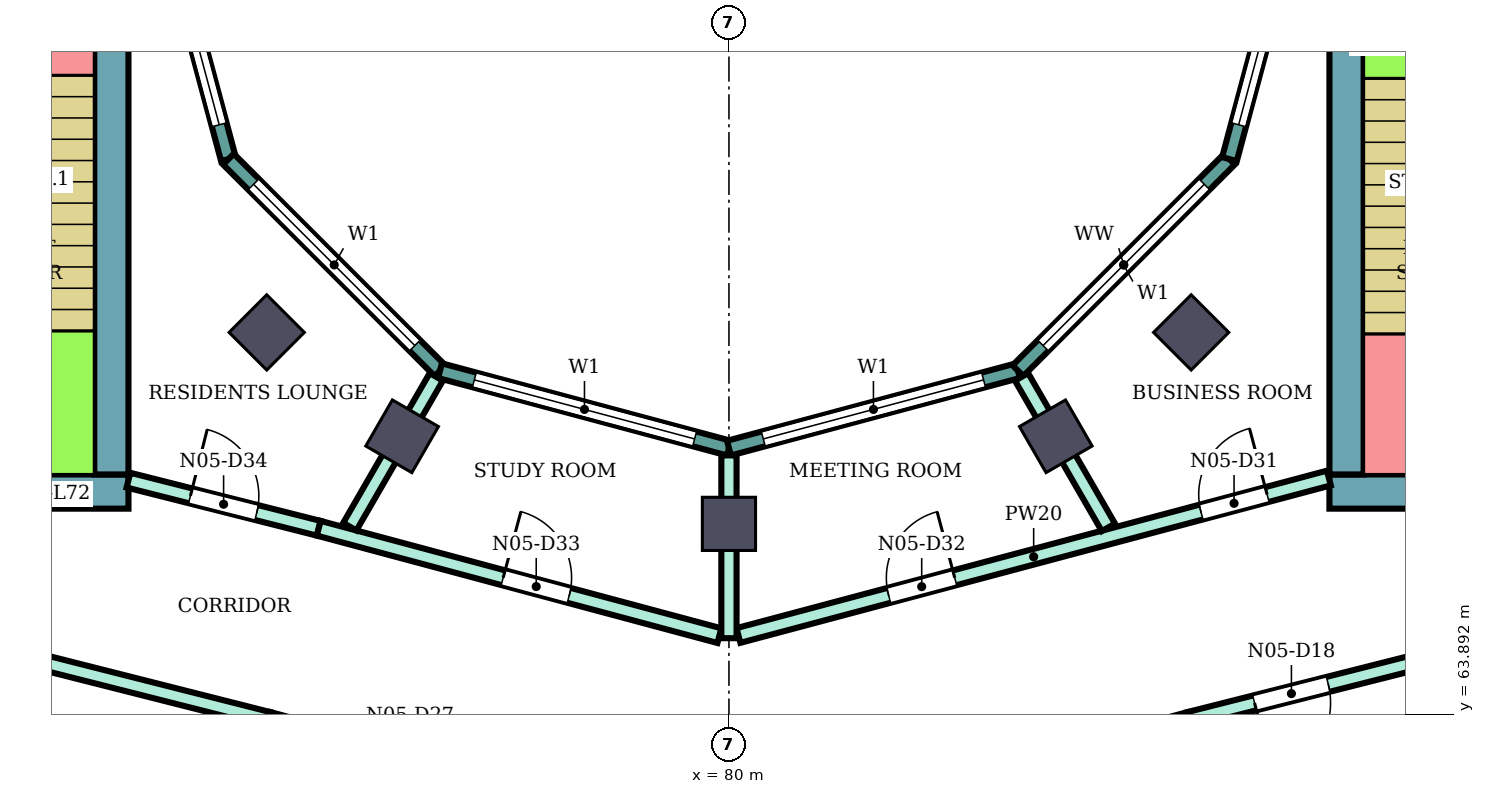
"""IFC4 building model, lengths in metres.
Left out: names, types, materials, properties, quantities, classifications, styles, units other than length and angle.
Written with IfcOpenShell. Run it as: python <this file> out.ifc"""

import sys

from ifc_helpers import new_model, si_unit, direction, frame, frame_2d, origin, origin_2d, place, context, subcontext, project, spatial, rectangle, extrude, element, fill, save


model = new_model("IFC4")
c1 = context("Model", 3, precision=1e-05, world=origin(), true_north=direction((0.0, 1.0)))
c2 = subcontext(c1, "Body", "Model", "MODEL_VIEW")
j1 = project(units=[si_unit("LENGTHUNIT", "METRE"), si_unit("PLANEANGLEUNIT", "RADIAN")], contexts=[c1])
p1 = place(None, origin())
s1 = spatial("IfcSite", under=j1, at=p1, CompositionType="ELEMENT")
p2 = place(p1, origin())
s2 = spatial("IfcBuilding", under=s1, at=p2, CompositionType="ELEMENT")
p3 = place(p2, frame((0.0, 0.0, 314.9)))
s3 = spatial("IfcBuildingStorey", under=s2, at=p3, CompositionType="ELEMENT", Elevation=314.9)
for number, where, z_axis, x_axis in (
    (1, (73.919, 68.919, 0.0), (0.0, 0.0, 1.0), (-0.707, -0.707, 0.0)),
    (2, (75.7, 67.552, 0.0), (0.0, 0.0, 1.0), (-0.5, -0.866, 0.0)),
    (3, (80.0, 66.4, 0.0), (0.0, 0.0, 1.0), (0.0, -1.0, 0.0)),
    (4, (84.3, 67.552, 0.0), (0.0, 0.0, 1.0), (0.5, -0.866, 0.0)),
    (5, (86.081, 68.919, 0.0), (0.0, 0.0, 1.0), (0.707, -0.707, 0.0)),
):
    element("IfcColumn", number, at=place(p3, frame(where, z_axis=z_axis, x_axis=x_axis)), inside=s3, PredefinedType="COLUMN", context=c2, shape_type="SweptSolid", body=[
        extrude(rectangle(XDim=0.7, YDim=0.7, at=origin_2d()), origin(), (0.0, 0.0, 1.0), 4.4),
    ])
p4 = place(p3, frame((87.9, 66.825, 0.0), z_axis=(0.0, 0.0, 1.0), x_axis=(1.0, 0.0, 0.0)))
e6 = element("IfcWall", 6, at=p4, inside=s3, PredefinedType="SHEAR", context=c2, shape_type="SweptSolid", body=[
    extrude(rectangle(XDim=10.0, YDim=0.45, at=frame_2d((5.0, 0.0))), origin(), (0.0, 0.0, 1.0), 4.08),
])
p5 = place(p4, frame((4.2, 0.0, 0.0)))
e7 = element("IfcOpeningElement", 7, at=p5, cuts=e6, PredefinedType="OPENING", context=c2, shape_type="SweptSolid", body=[
    extrude(rectangle(XDim=2.4, YDim=2.4, at=frame_2d((1.2, 1.2))), frame((0.0, 0.235, 0.0), z_axis=(0.0, -1.0, 0.0), x_axis=(1.0, 0.0, 0.0)), (0.0, 0.0, 1.0), 0.47),
])
p6 = place(p3, frame((88.125, 67.05, 0.0), z_axis=(0.0, 0.0, 1.0), x_axis=(0.0, 1.0, 0.0)))
e8 = element("IfcWall", 8, at=p6, inside=s3, PredefinedType="SHEAR", context=c2, shape_type="SweptSolid", body=[
    extrude(rectangle(XDim=7.95, YDim=0.45, at=frame_2d((3.975, 0.0))), origin(), (0.0, 0.0, 1.0), 4.08),
])
p7 = place(p3, frame((72.1, 66.825, 0.0), z_axis=(0.0, 0.0, 1.0), x_axis=(-1.0, 0.0, 0.0)))
e9 = element("IfcWall", 9, at=p7, inside=s3, PredefinedType="SHEAR", context=c2, shape_type="SweptSolid", body=[
    extrude(rectangle(XDim=10.0, YDim=0.45, at=frame_2d((5.0, 0.0))), origin(), (0.0, 0.0, 1.0), 4.08),
])
p8 = place(p7, frame((4.2, 0.0, 0.0)))
e10 = element("IfcOpeningElement", 10, at=p8, cuts=e9, PredefinedType="OPENING", context=c2, shape_type="SweptSolid", body=[
    extrude(rectangle(XDim=2.4, YDim=2.4, at=frame_2d((1.2, 1.2))), frame((0.0, 0.235, 0.0), z_axis=(0.0, -1.0, 0.0), x_axis=(1.0, 0.0, 0.0)), (0.0, 0.0, 1.0), 0.47),
])
p9 = place(p3, frame((71.875, 75.0, 0.0), z_axis=(0.0, 0.0, 1.0), x_axis=(0.0, -1.0, 0.0)))
e11 = element("IfcWall", 11, at=p9, inside=s3, PredefinedType="SHEAR", context=c2, shape_type="SweptSolid", body=[
    extrude(rectangle(XDim=7.95, YDim=0.45, at=frame_2d((3.975, 0.0))), origin(), (0.0, 0.0, 1.0), 4.08),
])
p10 = place(p3, frame((72.396, 75.0, 0.0), z_axis=(0.0, 0.0, 1.0), x_axis=(0.258789828301, -0.965933654434, 0.0)))
e12 = element("IfcWall", 12, at=p10, inside=s3, PredefinedType="NOTDEFINED", context=c2, shape_type="SweptSolid", body=[
    extrude(rectangle(XDim=3.936, YDim=0.2, at=frame_2d((1.968, 0.0))), origin(), (0.0, 0.0, 1.0), 4.4),
])
p11 = place(p10, frame((0.468, 0.0, 0.9)))
e13 = element("IfcOpeningElement", 13, at=p11, cuts=e12, PredefinedType="OPENING", context=c2, shape_type="SweptSolid", body=[
    extrude(rectangle(XDim=3.0, YDim=2.3, at=frame_2d((1.5, 1.15))), frame((0.0, 0.11, 0.0), z_axis=(0.0, -1.0, 0.0), x_axis=(1.0, 0.0, 0.0)), (0.0, 0.0, 1.0), 0.22),
])
p12 = place(p3, frame((73.415, 71.198, 0.0), z_axis=(0.0, 0.0, 1.0), x_axis=(0.707106781187, -0.707106781187, 0.0)))
e14 = element("IfcWall", 14, at=p12, inside=s3, PredefinedType="NOTDEFINED", context=c2, shape_type="SweptSolid", body=[
    extrude(rectangle(XDim=3.936, YDim=0.2, at=frame_2d((1.968, 0.0))), origin(), (0.0, 0.0, 1.0), 4.4),
])
p13 = place(p12, frame((0.468, 0.0, 0.9)))
e15 = element("IfcOpeningElement", 15, at=p13, cuts=e14, PredefinedType="OPENING", context=c2, shape_type="SweptSolid", body=[
    extrude(rectangle(XDim=3.0, YDim=2.3, at=frame_2d((1.5, 1.15))), frame((0.0, 0.11, 0.0), z_axis=(0.0, -1.0, 0.0), x_axis=(1.0, 0.0, 0.0)), (0.0, 0.0, 1.0), 0.22),
])
p14 = place(p3, frame((76.198, 68.415, 0.0), z_axis=(0.0, 0.0, 1.0), x_axis=(0.965933654434, -0.258789828301, 0.0)))
e16 = element("IfcWall", 16, at=p14, inside=s3, PredefinedType="NOTDEFINED", context=c2, shape_type="SweptSolid", body=[
    extrude(rectangle(XDim=3.936, YDim=0.2, at=frame_2d((1.968, 0.0))), origin(), (0.0, 0.0, 1.0), 4.4),
])
p15 = place(p14, frame((0.468, 0.0, 0.9)))
e17 = element("IfcOpeningElement", 17, at=p15, cuts=e16, PredefinedType="OPENING", context=c2, shape_type="SweptSolid", body=[
    extrude(rectangle(XDim=3.0, YDim=2.3, at=frame_2d((1.5, 1.15))), frame((0.0, 0.11, 0.0), z_axis=(0.0, -1.0, 0.0), x_axis=(1.0, 0.0, 0.0)), (0.0, 0.0, 1.0), 0.22),
])
p16 = place(p3, frame((80.0, 67.396, 0.0), z_axis=(0.0, 0.0, 1.0), x_axis=(0.965933654434, 0.258789828301, 0.0)))
e18 = element("IfcWall", 18, at=p16, inside=s3, PredefinedType="NOTDEFINED", context=c2, shape_type="SweptSolid", body=[
    extrude(rectangle(XDim=3.936, YDim=0.2, at=frame_2d((1.968, 0.0))), origin(), (0.0, 0.0, 1.0), 4.4),
])
p17 = place(p16, frame((0.468, 0.0, 0.9)))
e19 = element("IfcOpeningElement", 19, at=p17, cuts=e18, PredefinedType="OPENING", context=c2, shape_type="SweptSolid", body=[
    extrude(rectangle(XDim=3.0, YDim=2.3, at=frame_2d((1.5, 1.15))), frame((0.0, 0.11, 0.0), z_axis=(0.0, -1.0, 0.0), x_axis=(1.0, 0.0, 0.0)), (0.0, 0.0, 1.0), 0.22),
])
p18 = place(p3, frame((83.802, 68.415, 0.0), z_axis=(0.0, 0.0, 1.0), x_axis=(0.707106781187, 0.707106781187, 0.0)))
e20 = element("IfcWall", 20, at=p18, inside=s3, PredefinedType="NOTDEFINED", context=c2, shape_type="SweptSolid", body=[
    extrude(rectangle(XDim=3.936, YDim=0.2, at=frame_2d((1.968, 0.0))), origin(), (0.0, 0.0, 1.0), 4.4),
])
p19 = place(p18, frame((0.468, 0.0, 0.9)))
e21 = element("IfcOpeningElement", 21, at=p19, cuts=e20, PredefinedType="OPENING", context=c2, shape_type="SweptSolid", body=[
    extrude(rectangle(XDim=3.0, YDim=2.3, at=frame_2d((1.5, 1.15))), frame((0.0, 0.11, 0.0), z_axis=(0.0, -1.0, 0.0), x_axis=(1.0, 0.0, 0.0)), (0.0, 0.0, 1.0), 0.22),
])
p20 = place(p3, frame((86.585, 71.198, 0.0), z_axis=(0.0, 0.0, 1.0), x_axis=(0.258789828301, 0.965933654434, 0.0)))
e22 = element("IfcWall", 22, at=p20, inside=s3, PredefinedType="NOTDEFINED", context=c2, shape_type="SweptSolid", body=[
    extrude(rectangle(XDim=3.936, YDim=0.2, at=frame_2d((1.968, 0.0))), origin(), (0.0, 0.0, 1.0), 4.4),
])
p21 = place(p20, frame((0.468, 0.0, 0.9)))
e23 = element("IfcOpeningElement", 23, at=p21, cuts=e22, PredefinedType="OPENING", context=c2, shape_type="SweptSolid", body=[
    extrude(rectangle(XDim=3.0, YDim=2.3, at=frame_2d((1.5, 1.15))), frame((0.0, 0.11, 0.0), z_axis=(0.0, -1.0, 0.0), x_axis=(1.0, 0.0, 0.0)), (0.0, 0.0, 1.0), 0.22),
])
p22 = place(p3, frame((68.201, 65.28, 0.0), z_axis=(0.0, 0.0, 1.0), x_axis=(0.969421088032, -0.245403247897, 0.0)))
e24 = element("IfcWall", 24, at=p22, inside=s3, PredefinedType="PARTITIONING", context=c2, shape_type="SweptSolid", body=[
    extrude(rectangle(XDim=5.927, YDim=0.2, at=frame_2d((2.964, 0.0))), origin(), (0.0, 0.0, 1.0), 3.95),
])
p23 = place(p3, frame((72.1, 66.975, 0.0), z_axis=(0.0, 0.0, 1.0), x_axis=(0.969471314457, -0.245204752086, 0.0)))
e25 = element("IfcWall", 25, at=p23, inside=s3, PredefinedType="PARTITIONING", context=c2, shape_type="SweptSolid", body=[
    extrude(rectangle(XDim=2.582, YDim=0.2, at=frame_2d((1.291, 0.0))), origin(), (0.0, 0.0, 1.0), 3.95),
])
p24 = place(p23, frame((0.841, 0.0, 0.0)))
e26 = element("IfcOpeningElement", 26, at=p24, cuts=e25, PredefinedType="OPENING", context=c2, shape_type="SweptSolid", body=[
    extrude(rectangle(XDim=0.9, YDim=2.1, at=frame_2d((0.45, 1.05))), frame((0.0, 0.11, 0.0), z_axis=(0.0, -1.0, 0.0), x_axis=(1.0, 0.0, 0.0)), (0.0, 0.0, 1.0), 0.22),
])
p25 = place(p3, frame((73.947, 63.826, 0.0), z_axis=(0.0, 0.0, 1.0), x_axis=(0.965894934009, -0.25893430915, 0.0)))
e27 = element("IfcWall", 27, at=p25, inside=s3, PredefinedType="PARTITIONING", context=c2, shape_type="SweptSolid", body=[
    extrude(rectangle(XDim=6.177, YDim=0.2, at=frame_2d((3.088, 0.0))), origin(), (0.0, 0.0, 1.0), 3.95),
])
p26 = place(p25, frame((3.336, 0.0, 0.0)))
e28 = element("IfcOpeningElement", 28, at=p26, cuts=e27, PredefinedType="OPENING", context=c2, shape_type="SweptSolid", body=[
    extrude(rectangle(XDim=1.0, YDim=2.1, at=frame_2d((0.5, 1.05))), frame((0.0, 0.11, 0.0), z_axis=(0.0, -1.0, 0.0), x_axis=(1.0, 0.0, 0.0)), (0.0, 0.0, 1.0), 0.22),
])
p27 = place(p25, frame((1.424, 0.0, 0.0)))
e29 = element("IfcOpeningElement", 29, at=p27, cuts=e27, PredefinedType="OPENING", context=c2, shape_type="SweptSolid", body=[
    extrude(rectangle(XDim=1.0, YDim=2.1, at=frame_2d((0.5, 1.05))), frame((0.0, 0.11, 0.0), z_axis=(0.0, -1.0, 0.0), x_axis=(1.0, 0.0, 0.0)), (0.0, 0.0, 1.0), 0.22),
])
p28 = place(p3, frame((74.603, 66.342, 0.0), z_axis=(0.0, 0.0, 1.0), x_axis=(0.965920893652, -0.258837453254, 0.0)))
e30 = element("IfcWall", 30, at=p28, inside=s3, PredefinedType="PARTITIONING", context=c2, shape_type="SweptSolid", body=[
    extrude(rectangle(XDim=5.458, YDim=0.2, at=frame_2d((2.729, 0.0))), origin(), (0.0, 0.0, 1.0), 3.95),
])
p29 = place(p28, frame((2.512, 0.0, 0.0)))
e31 = element("IfcOpeningElement", 31, at=p29, cuts=e30, PredefinedType="OPENING", context=c2, shape_type="SweptSolid", body=[
    extrude(rectangle(XDim=0.9, YDim=2.1, at=frame_2d((0.45, 1.05))), frame((0.0, 0.11, 0.0), z_axis=(0.0, -1.0, 0.0), x_axis=(1.0, 0.0, 0.0)), (0.0, 0.0, 1.0), 0.22),
])
p30 = place(p3, frame((75.012, 66.363, 0.0), z_axis=(0.0, 0.0, 1.0), x_axis=(0.500143511652, 0.865942531438, 0.0)))
e32 = element("IfcWall", 32, at=p30, inside=s3, PredefinedType="PARTITIONING", context=c2, shape_type="SweptSolid", body=[
    extrude(rectangle(XDim=2.275, YDim=0.2, at=frame_2d((1.138, 0.0))), origin(), (0.0, 0.0, 1.0), 3.95),
])
p31 = place(p3, frame((80.125, 64.932, 0.0), z_axis=(0.0, 0.0, 1.0), x_axis=(0.966236955806, 0.257655089674, 0.0)))
e33 = element("IfcWall", 33, at=p31, inside=s3, PredefinedType="PARTITIONING", context=c2, shape_type="SweptSolid", body=[
    extrude(rectangle(XDim=8.039, YDim=0.2, at=frame_2d((4.02, 0.0))), origin(), (0.0, 0.0, 1.0), 3.95),
])
p32 = place(p31, frame((6.298, 0.0, 0.0)))
e34 = element("IfcOpeningElement", 34, at=p32, cuts=e33, PredefinedType="OPENING", context=c2, shape_type="SweptSolid", body=[
    extrude(rectangle(XDim=0.9, YDim=2.1, at=frame_2d((0.45, 1.05))), frame((0.0, 0.11, 0.0), z_axis=(0.0, -1.0, 0.0), x_axis=(1.0, 0.0, 0.0)), (0.0, 0.0, 1.0), 0.22),
])
p33 = place(p31, frame((2.045, 0.0, 0.0)))
e35 = element("IfcOpeningElement", 35, at=p33, cuts=e33, PredefinedType="OPENING", context=c2, shape_type="SweptSolid", body=[
    extrude(rectangle(XDim=0.9, YDim=2.1, at=frame_2d((0.45, 1.05))), frame((0.0, 0.11, 0.0), z_axis=(0.0, -1.0, 0.0), x_axis=(1.0, 0.0, 0.0)), (0.0, 0.0, 1.0), 0.22),
])
p34 = place(p3, frame((80.0, 62.204, 0.0), z_axis=(0.0, 0.0, 1.0), x_axis=(0.965938139786, 0.258773086132, 0.0)))
e36 = element("IfcWall", 36, at=p34, inside=s3, PredefinedType="PARTITIONING", context=c2, shape_type="SweptSolid", body=[
    extrude(rectangle(XDim=6.266, YDim=0.2, at=frame_2d((3.133, 0.0))), origin(), (0.0, 0.0, 1.0), 3.95),
])
p35 = place(p3, frame((80.0, 64.896, 0.0), z_axis=(0.0, 0.0, 1.0), x_axis=(0.0, 1.0, 0.0)))
e37 = element("IfcWall", 37, at=p35, inside=s3, PredefinedType="PARTITIONING", context=c2, shape_type="SweptSolid", body=[
    extrude(rectangle(XDim=2.405, YDim=0.2, at=frame_2d((1.203, 0.0))), origin(), (0.0, 0.0, 1.0), 3.95),
])
p36 = place(p3, frame((83.85, 68.333, 0.0), z_axis=(0.0, 0.0, 1.0), x_axis=(0.500080019051, -0.865979199835, 0.0)))
e38 = element("IfcWall", 38, at=p36, inside=s3, PredefinedType="PARTITIONING", context=c2, shape_type="SweptSolid", body=[
    extrude(rectangle(XDim=2.285, YDim=0.2, at=frame_2d((1.143, 0.0))), origin(), (0.0, 0.0, 1.0), 3.95),
])
p37 = place(p3, frame((86.053, 63.826, 0.0), z_axis=(0.0, 0.0, 1.0), x_axis=(0.969480070232, 0.245170131586, 0.0)))
e39 = element("IfcWall", 39, at=p37, inside=s3, PredefinedType="PARTITIONING", context=c2, shape_type="SweptSolid", body=[
    extrude(rectangle(XDim=5.907, YDim=0.2, at=frame_2d((2.954, 0.0))), origin(), (0.0, 0.0, 1.0), 3.95),
])
p38 = place(p37, frame((0.889, 0.0, 0.0)))
e40 = element("IfcOpeningElement", 40, at=p38, cuts=e39, PredefinedType="OPENING", context=c2, shape_type="SweptSolid", body=[
    extrude(rectangle(XDim=1.0, YDim=2.1, at=frame_2d((0.5, 1.05))), frame((0.0, 0.11, 0.0), z_axis=(0.0, -1.0, 0.0), x_axis=(1.0, 0.0, 0.0)), (0.0, 0.0, 1.0), 0.22),
])
p39 = place(p11, origin())
e41 = element("IfcWindow", 41, at=p39, inside=s3, PartitioningType="SINGLE_PANEL", PredefinedType="WINDOW", context=c2, shape_type="SweptSolid", body=[
    extrude(rectangle(XDim=3.0, YDim=2.3, at=frame_2d((1.5, 1.15))), frame((0.0, 0.03, 0.0), z_axis=(0.0, -1.0, 0.0), x_axis=(1.0, 0.0, 0.0)), (0.0, 0.0, 1.0), 0.06),
])
fill(e13, e41)
p40 = place(p13, origin())
e42 = element("IfcWindow", 42, at=p40, inside=s3, PartitioningType="SINGLE_PANEL", PredefinedType="WINDOW", context=c2, shape_type="SweptSolid", body=[
    extrude(rectangle(XDim=3.0, YDim=2.3, at=frame_2d((1.5, 1.15))), frame((0.0, 0.03, 0.0), z_axis=(0.0, -1.0, 0.0), x_axis=(1.0, 0.0, 0.0)), (0.0, 0.0, 1.0), 0.06),
])
fill(e15, e42)
p41 = place(p15, origin())
e43 = element("IfcWindow", 43, at=p41, inside=s3, PartitioningType="SINGLE_PANEL", PredefinedType="WINDOW", context=c2, shape_type="SweptSolid", body=[
    extrude(rectangle(XDim=3.0, YDim=2.3, at=frame_2d((1.5, 1.15))), frame((0.0, 0.03, 0.0), z_axis=(0.0, -1.0, 0.0), x_axis=(1.0, 0.0, 0.0)), (0.0, 0.0, 1.0), 0.06),
])
fill(e17, e43)
p42 = place(p17, origin())
e44 = element("IfcWindow", 44, at=p42, inside=s3, PartitioningType="SINGLE_PANEL", PredefinedType="WINDOW", context=c2, shape_type="SweptSolid", body=[
    extrude(rectangle(XDim=3.0, YDim=2.3, at=frame_2d((1.5, 1.15))), frame((0.0, 0.03, 0.0), z_axis=(0.0, -1.0, 0.0), x_axis=(1.0, 0.0, 0.0)), (0.0, 0.0, 1.0), 0.06),
])
fill(e19, e44)
p43 = place(p19, origin())
e45 = element("IfcWindow", 45, at=p43, inside=s3, PartitioningType="SINGLE_PANEL", PredefinedType="WINDOW", context=c2, shape_type="SweptSolid", body=[
    extrude(rectangle(XDim=3.0, YDim=2.3, at=frame_2d((1.5, 1.15))), frame((0.0, 0.03, 0.0), z_axis=(0.0, -1.0, 0.0), x_axis=(1.0, 0.0, 0.0)), (0.0, 0.0, 1.0), 0.06),
])
fill(e21, e45)
p44 = place(p21, origin())
e46 = element("IfcWindow", 46, at=p44, inside=s3, PartitioningType="SINGLE_PANEL", PredefinedType="WINDOW", context=c2, shape_type="SweptSolid", body=[
    extrude(rectangle(XDim=3.0, YDim=2.3, at=frame_2d((1.5, 1.15))), frame((0.0, 0.03, 0.0), z_axis=(0.0, -1.0, 0.0), x_axis=(1.0, 0.0, 0.0)), (0.0, 0.0, 1.0), 0.06),
])
fill(e23, e46)
p45 = place(p38, frame((1.0, 0.0, 0.0), z_axis=(0.0, 0.0, 1.0), x_axis=(-1.0, 0.0, 0.0)))
e47 = element("IfcDoor", 47, at=p45, inside=s3, OperationType="SINGLE_SWING_RIGHT", PredefinedType="DOOR", context=c2, shape_type="SweptSolid", body=[
    extrude(rectangle(XDim=1.0, YDim=2.1, at=frame_2d((0.5, 1.05))), frame((0.0, 0.025, 0.0), z_axis=(0.0, -1.0, 0.0), x_axis=(1.0, 0.0, 0.0)), (0.0, 0.0, 1.0), 0.05),
])
fill(e40, e47)
p46 = place(p32, origin())
e48 = element("IfcDoor", 48, at=p46, inside=s3, OperationType="SINGLE_SWING_RIGHT", PredefinedType="DOOR", context=c2, shape_type="SweptSolid", body=[
    extrude(rectangle(XDim=0.9, YDim=2.1, at=frame_2d((0.45, 1.05))), frame((0.0, 0.025, 0.0), z_axis=(0.0, -1.0, 0.0), x_axis=(1.0, 0.0, 0.0)), (0.0, 0.0, 1.0), 0.05),
])
fill(e34, e48)
p47 = place(p33, origin())
e49 = element("IfcDoor", 49, at=p47, inside=s3, OperationType="SINGLE_SWING_RIGHT", PredefinedType="DOOR", context=c2, shape_type="SweptSolid", body=[
    extrude(rectangle(XDim=0.9, YDim=2.1, at=frame_2d((0.45, 1.05))), frame((0.0, 0.025, 0.0), z_axis=(0.0, -1.0, 0.0), x_axis=(1.0, 0.0, 0.0)), (0.0, 0.0, 1.0), 0.05),
])
fill(e35, e49)
p48 = place(p29, origin())
e50 = element("IfcDoor", 50, at=p48, inside=s3, OperationType="SINGLE_SWING_LEFT", PredefinedType="DOOR", context=c2, shape_type="SweptSolid", body=[
    extrude(rectangle(XDim=0.9, YDim=2.1, at=frame_2d((0.45, 1.05))), frame((0.0, 0.025, 0.0), z_axis=(0.0, -1.0, 0.0), x_axis=(1.0, 0.0, 0.0)), (0.0, 0.0, 1.0), 0.05),
])
fill(e31, e50)
p49 = place(p24, origin())
e51 = element("IfcDoor", 51, at=p49, inside=s3, OperationType="SINGLE_SWING_LEFT", PredefinedType="DOOR", context=c2, shape_type="SweptSolid", body=[
    extrude(rectangle(XDim=0.9, YDim=2.1, at=frame_2d((0.45, 1.05))), frame((0.0, 0.025, 0.0), z_axis=(0.0, -1.0, 0.0), x_axis=(1.0, 0.0, 0.0)), (0.0, 0.0, 1.0), 0.05),
])
fill(e26, e51)
save(model, sys.argv[1])
